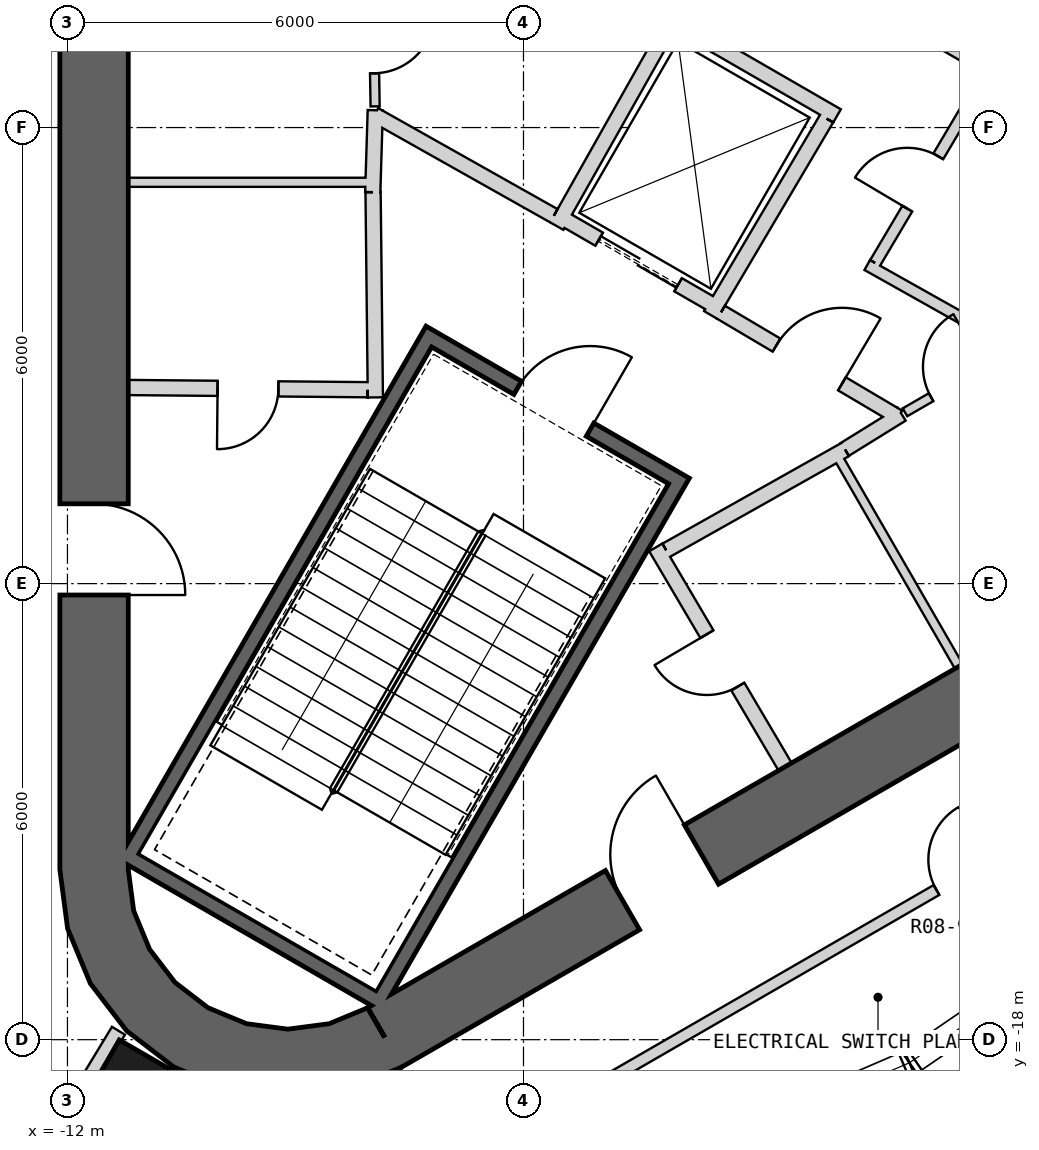
"""IFC4 building model, lengths in metres.
Left out: names, types, materials, properties, quantities, classifications, styles, units other than length and angle.
Written with IfcOpenShell. Run it as: python <this file> out.ifc"""

import sys

from ifc_helpers import new_model, si_unit, direction, frame, frame_2d, origin, origin_2d, place, context, subcontext, project, spatial, polyline, rectangle, outline, extrude, element, fill, save


model = new_model("IFC4")
c1 = context("Model", 3, precision=1e-05, world=origin(), true_north=direction((0.0, 1.0)))
c2 = subcontext(c1, "Body", "Model", "MODEL_VIEW")
j1 = project(units=[si_unit("LENGTHUNIT", "METRE"), si_unit("PLANEANGLEUNIT", "RADIAN")], contexts=[c1])
p1 = place(None, origin())
s1 = spatial("IfcSite", under=j1, at=p1, CompositionType="ELEMENT")
p2 = place(p1, origin())
s2 = spatial("IfcBuilding", under=s1, at=p2, CompositionType="ELEMENT")
p3 = place(p2, frame((0.0, 0.0, 430.3)))
s3 = spatial("IfcBuildingStorey", under=s2, at=p3, CompositionType="ELEMENT", Elevation=430.3)
p4 = place(p3, frame((-11.025, -19.097, 0.0), z_axis=(0.0, 0.0, 1.0), x_axis=(-0.5, -0.866025403784, 0.0)))
e1 = element("IfcColumn", 1, at=p4, inside=s3, PredefinedType="COLUMN", context=c2, shape_type="SweptSolid", body=[
    extrude(rectangle(XDim=1.6, YDim=1.6, at=origin_2d()), origin(), (0.0, 0.0, 1.0), 5.0),
])
p5 = place(p3, frame((-11.65, 15.762, 0.0), z_axis=(0.0, 0.0, 1.0), x_axis=(0.0, -1.0, 0.0)))
e2 = element("IfcWall", 2, at=p5, inside=s3, PredefinedType="SHEAR", context=c2, shape_type="SweptSolid", body=[
    extrude(rectangle(XDim=31.523, YDim=0.9, at=frame_2d((15.762, 0.0))), origin(), (0.0, 0.0, 1.0), 5.0),
])
p6 = place(p5, frame((3.612, 0.0, 0.0)))
e3 = element("IfcOpeningElement", 3, at=p6, cuts=e2, PredefinedType="OPENING", context=c2, shape_type="SweptSolid", body=[
    extrude(rectangle(XDim=1.2, YDim=2.4, at=frame_2d((0.6, 1.2))), frame((0.0, 0.46, 0.0), z_axis=(0.0, -1.0, 0.0), x_axis=(1.0, 0.0, 0.0)), (0.0, 0.0, 1.0), 0.92),
])
p7 = place(p5, frame((26.712, 0.0, 0.0)))
e4 = element("IfcOpeningElement", 4, at=p7, cuts=e2, PredefinedType="OPENING", context=c2, shape_type="SweptSolid", body=[
    extrude(rectangle(XDim=1.2, YDim=2.4, at=frame_2d((0.6, 1.2))), frame((0.0, 0.46, 0.0), z_axis=(0.0, -1.0, 0.0), x_axis=(1.0, 0.0, 0.0)), (0.0, 0.0, 1.0), 0.92),
])
p8 = place(p3, frame((-7.825, -17.97, 0.0), z_axis=(0.0, 0.0, 1.0), x_axis=(0.866028369851, 0.499994862586, 0.0)))
e5 = element("IfcWall", 5, at=p8, inside=s3, PredefinedType="SHEAR", context=c2, shape_type="SweptSolid", body=[
    extrude(rectangle(XDim=31.523, YDim=0.9, at=frame_2d((15.762, 0.0))), origin(), (0.0, 0.0, 1.0), 5.0),
])
p9 = place(p8, frame((17.862, 0.0, 0.0)))
e6 = element("IfcOpeningElement", 6, at=p9, cuts=e5, PredefinedType="OPENING", context=c2, shape_type="SweptSolid", body=[
    extrude(rectangle(XDim=1.2, YDim=2.4, at=frame_2d((0.6, 1.2))), frame((0.0, 0.46, 0.0), z_axis=(0.0, -1.0, 0.0), x_axis=(1.0, 0.0, 0.0)), (0.0, 0.0, 1.0), 0.92),
])
p10 = place(p8, frame((20.562, 0.0, 0.0)))
e7 = element("IfcOpeningElement", 7, at=p10, cuts=e5, PredefinedType="OPENING", context=c2, shape_type="SweptSolid", body=[
    extrude(rectangle(XDim=1.2, YDim=2.4, at=frame_2d((0.6, 1.2))), frame((0.0, 0.46, 0.0), z_axis=(0.0, -1.0, 0.0), x_axis=(1.0, 0.0, 0.0)), (0.0, 0.0, 1.0), 0.92),
])
p11 = place(p8, frame((26.712, 0.0, 0.0)))
e8 = element("IfcOpeningElement", 8, at=p11, cuts=e5, PredefinedType="OPENING", context=c2, shape_type="SweptSolid", body=[
    extrude(rectangle(XDim=1.2, YDim=2.4, at=frame_2d((0.6, 1.2))), frame((0.0, 0.46, 0.0), z_axis=(0.0, -1.0, 0.0), x_axis=(1.0, 0.0, 0.0)), (0.0, 0.0, 1.0), 0.92),
])
p12 = place(p8, frame((3.612, 0.0, 0.0)))
e9 = element("IfcOpeningElement", 9, at=p12, cuts=e5, PredefinedType="OPENING", context=c2, shape_type="SweptSolid", body=[
    extrude(rectangle(XDim=1.2, YDim=2.4, at=frame_2d((0.6, 1.2))), frame((0.0, 0.46, 0.0), z_axis=(0.0, -1.0, 0.0), x_axis=(1.0, 0.0, 0.0)), (0.0, 0.0, 1.0), 0.92),
])
p13 = place(p3, origin())
e10 = element("IfcWall", 10, at=p13, inside=s3, PredefinedType="SHEAR", context=c2, shape_type="SweptSolid", body=[
    extrude(outline(polyline([(-12.1, -15.762), (-11.998, -16.538), (-11.698, -17.262), (-11.221, -17.883), (-10.6, -18.36), (-9.876, -18.659), (-9.1, -18.762), (-8.323, -18.659), (-7.6, -18.36), (-8.05, -17.58), (-8.556, -17.79), (-9.1, -17.862), (-9.644, -17.79), (-10.15, -17.58), (-10.585, -17.247), (-10.919, -16.812), (-11.128, -16.305), (-11.2, -15.762), (-12.1, -15.762)])), origin(), (0.0, 0.0, 1.0), 5.0),
])
p14 = place(p3, frame((-3.905, -10.563, -0.25), z_axis=(0.0, 0.0, 1.0), x_axis=(-0.500012932018, -0.866017937352, 0.0)))
e11 = element("IfcWall", 11, at=p14, inside=s3, PredefinedType="SHEAR", context=c2, shape_type="SweptSolid", body=[
    extrude(rectangle(XDim=8.1, YDim=0.2, at=frame_2d((4.05, 0.0))), origin(), (0.0, 0.0, 1.0), 5.0),
])
p15 = place(p3, frame((-11.282, -15.541, -0.25), z_axis=(0.0, 0.0, 1.0), x_axis=(0.866000483506, -0.500043160704, 0.0)))
e12 = element("IfcWall", 12, at=p15, inside=s3, PredefinedType="SHEAR", context=c2, shape_type="SweptSolid", body=[
    extrude(rectangle(XDim=3.8, YDim=0.2, at=frame_2d((1.9, 0.0))), origin(), (0.0, 0.0, 1.0), 5.0),
])
p16 = place(p3, frame((-7.196, -8.663, -0.25), z_axis=(0.0, 0.0, 1.0), x_axis=(-0.499997992926, -0.866026562566, 0.0)))
e13 = element("IfcWall", 13, at=p16, inside=s3, PredefinedType="SHEAR", context=c2, shape_type="SweptSolid", body=[
    extrude(rectangle(XDim=7.9, YDim=0.2, at=frame_2d((3.95, 0.0))), origin(), (0.0, 0.0, 1.0), 5.0),
])
p17 = place(p3, frame((-4.041, -10.599, -0.25), z_axis=(0.0, 0.0, 1.0), x_axis=(-0.866047807691, 0.499961193289, 0.0)))
e14 = element("IfcWall", 14, at=p17, inside=s3, PredefinedType="SHEAR", context=c2, shape_type="SweptSolid", body=[
    extrude(rectangle(XDim=3.6, YDim=0.2, at=frame_2d((1.8, 0.0))), origin(), (0.0, 0.0, 1.0), 5.0),
])
p18 = place(p17, frame((1.25, 0.0, 0.25)))
e15 = element("IfcOpeningElement", 15, at=p18, cuts=e14, PredefinedType="OPENING", context=c2, shape_type="SweptSolid", body=[
    extrude(rectangle(XDim=1.1, YDim=2.1, at=frame_2d((0.55, 1.05))), frame((0.0, 0.11, 0.0), z_axis=(0.0, -1.0, 0.0), x_axis=(1.0, 0.0, 0.0)), (0.0, 0.0, 1.0), 0.22),
])
p19 = place(p3, frame((-3.446, -8.368, 0.0), z_axis=(0.0, 0.0, 1.0), x_axis=(-0.866024647952, 0.500001309137, 0.0)))
e16 = element("IfcWall", 16, at=p19, inside=s3, PredefinedType="PLUMBINGWALL", context=c2, shape_type="SweptSolid", body=[
    extrude(rectangle(XDim=2.4, YDim=0.2, at=frame_2d((1.2, 0.0))), origin(), (0.0, 0.0, 1.0), 4.75),
])
p20 = place(p19, frame((0.6, 0.0, 0.0)))
e17 = element("IfcOpeningElement", 17, at=p20, cuts=e16, PredefinedType="OPENING", context=c2, shape_type="SweptSolid", body=[
    extrude(rectangle(XDim=1.2, YDim=2.4, at=frame_2d((0.6, 1.2))), frame((0.0, 0.11, 0.0), z_axis=(0.0, -1.0, 0.0), x_axis=(1.0, 0.0, 0.0)), (0.0, 0.0, 1.0), 0.22),
])
p21 = place(p3, frame((-5.562, -7.296, 0.0), z_axis=(0.0, 0.0, 1.0), x_axis=(0.491358283181, 0.870957540612, 0.0)))
e18 = element("IfcWall", 18, at=p21, inside=s3, PredefinedType="PLUMBINGWALL", context=c2, shape_type="SweptSolid", body=[
    extrude(rectangle(XDim=3.2, YDim=0.2, at=frame_2d((1.6, 0.0))), origin(), (0.0, 0.0, 1.0), 4.75),
])
p22 = place(p3, frame((-3.953, -4.646, 0.0), z_axis=(0.0, 0.0, 1.0), x_axis=(0.866024647952, -0.500001309137, 0.0)))
e19 = element("IfcWall", 19, at=p22, inside=s3, PredefinedType="PLUMBINGWALL", context=c2, shape_type="SweptSolid", body=[
    extrude(rectangle(XDim=2.4, YDim=0.2, at=frame_2d((1.2, 0.0))), origin(), (0.0, 0.0, 1.0), 4.75),
])
p23 = place(p3, frame((-2.012, -5.882, 0.0), z_axis=(0.0, 0.0, 1.0), x_axis=(-0.508619639323, -0.860991325447, 0.0)))
e20 = element("IfcWall", 20, at=p23, inside=s3, PredefinedType="PLUMBINGWALL", context=c2, shape_type="SweptSolid", body=[
    extrude(rectangle(XDim=3.0, YDim=0.2, at=frame_2d((1.5, 0.0))), origin(), (0.0, 0.0, 1.0), 4.75),
])
p24 = place(p3, frame((-11.2, -6.72, 0.0), z_axis=(0.0, 0.0, 1.0), x_axis=(1.0, 0.0, 0.0)))
e21 = element("IfcWall", 21, at=p24, inside=s3, PredefinedType="PARTITIONING", context=c2, shape_type="SweptSolid", body=[
    extrude(rectangle(XDim=3.25, YDim=0.12, at=frame_2d((1.625, 0.0))), origin(), (0.0, 0.0, 1.0), 4.75),
])
p25 = place(p3, frame((-7.983, -6.85, 0.0), z_axis=(0.0, 0.0, 1.0), x_axis=(0.030803413295, 0.999525462272, 0.0)))
e22 = element("IfcWall", 22, at=p25, inside=s3, PredefinedType="PARTITIONING", context=c2, shape_type="SweptSolid", body=[
    extrude(rectangle(XDim=1.078, YDim=0.2, at=frame_2d((0.539, 0.0))), origin(), (0.0, 0.0, 1.0), 4.75),
])
p26 = place(p3, frame((-7.98, -4.05, 0.0), z_axis=(0.0, 0.0, 1.0), x_axis=(0.016798213807, -0.999858900052, 0.0)))
e23 = element("IfcWall", 23, at=p26, inside=s3, PredefinedType="PARTITIONING", context=c2, shape_type="SweptSolid", body=[
    extrude(rectangle(XDim=1.671, YDim=0.12, at=frame_2d((0.836, 0.0))), origin(), (0.0, 0.0, 1.0), 4.75),
])
p27 = place(p26, frame((0.436, 0.0, 0.0)))
e24 = element("IfcOpeningElement", 24, at=p27, cuts=e23, PredefinedType="OPENING", context=c2, shape_type="SweptSolid", body=[
    extrude(rectangle(XDim=0.8, YDim=2.1, at=frame_2d((0.4, 1.05))), frame((0.0, 0.07, 0.0), z_axis=(0.0, -1.0, 0.0), x_axis=(1.0, 0.0, 0.0)), (0.0, 0.0, 1.0), 0.14),
])
p28 = place(p3, frame((-7.949, -9.55, 0.0), z_axis=(0.0, 0.0, 1.0), x_axis=(-0.011121475088, 0.999938154483, 0.0)))
e25 = element("IfcWall", 25, at=p28, inside=s3, PredefinedType="PARTITIONING", context=c2, shape_type="SweptSolid", body=[
    extrude(rectangle(XDim=2.7, YDim=0.2, at=frame_2d((1.35, 0.0))), origin(), (0.0, 0.0, 1.0), 4.75),
])
p29 = place(p3, frame((-11.2, -9.42, 0.0), z_axis=(0.0, 0.0, 1.0), x_axis=(0.999957467379, -0.009222983926, 0.0)))
e26 = element("IfcWall", 26, at=p29, inside=s3, PredefinedType="PARTITIONING", context=c2, shape_type="SweptSolid", body=[
    extrude(rectangle(XDim=3.15, YDim=0.2, at=frame_2d((1.575, 0.0))), origin(), (0.0, 0.0, 1.0), 4.75),
])
p30 = place(p29, frame((1.175, 0.0, 0.0)))
e27 = element("IfcOpeningElement", 27, at=p30, cuts=e26, PredefinedType="OPENING", context=c2, shape_type="SweptSolid", body=[
    extrude(rectangle(XDim=0.8, YDim=2.1, at=frame_2d((0.4, 1.05))), frame((0.0, 0.11, 0.0), z_axis=(0.0, -1.0, 0.0), x_axis=(1.0, 0.0, 0.0)), (0.0, 0.0, 1.0), 0.22),
])
p31 = place(p3, frame((-1.897, -10.275, 0.0), z_axis=(0.0, 0.0, 1.0), x_axis=(0.499984717929, -0.866034226713, 0.0)))
e28 = element("IfcWall", 28, at=p31, inside=s3, PredefinedType="PARTITIONING", context=c2, shape_type="SweptSolid", body=[
    extrude(rectangle(XDim=3.25, YDim=0.12, at=frame_2d((1.625, 0.0))), origin(), (0.0, 0.0, 1.0), 4.75),
])
p32 = place(p3, frame((-4.26, -11.524, 0.0), z_axis=(0.0, 0.0, 1.0), x_axis=(0.507997497166, -0.861358544901, 0.0)))
e29 = element("IfcWall", 29, at=p32, inside=s3, PredefinedType="PARTITIONING", context=c2, shape_type="SweptSolid", body=[
    extrude(rectangle(XDim=3.35, YDim=0.2, at=frame_2d((1.675, 0.0))), origin(), (0.0, 0.0, 1.0), 4.75),
])
p33 = place(p32, frame((1.325, 0.0, 0.0)))
e30 = element("IfcOpeningElement", 30, at=p33, cuts=e29, PredefinedType="OPENING", context=c2, shape_type="SweptSolid", body=[
    extrude(rectangle(XDim=0.8, YDim=2.1, at=frame_2d((0.4, 1.05))), frame((0.0, 0.11, 0.0), z_axis=(0.0, -1.0, 0.0), x_axis=(1.0, 0.0, 0.0)), (0.0, 0.0, 1.0), 0.22),
])
p34 = place(p3, frame((-1.769, -10.237, 0.0), z_axis=(0.0, 0.0, 1.0), x_axis=(-0.871534483978, -0.490334215854, 0.0)))
e31 = element("IfcWall", 31, at=p34, inside=s3, PredefinedType="PARTITIONING", context=c2, shape_type="SweptSolid", body=[
    extrude(rectangle(XDim=2.7, YDim=0.2, at=frame_2d((1.35, 0.0))), origin(), (0.0, 0.0, 1.0), 4.75),
])
p35 = place(p3, frame((-1.024, -9.771, 0.0), z_axis=(0.0, 0.0, 1.0), x_axis=(-0.850348075135, -0.526220629693, 0.0)))
e32 = element("IfcWall", 32, at=p35, inside=s3, PredefinedType="PARTITIONING", context=c2, shape_type="SweptSolid", body=[
    extrude(rectangle(XDim=0.878, YDim=0.2, at=frame_2d((0.439, 0.0))), origin(), (0.0, 0.0, 1.0), 4.75),
])
p36 = place(p3, frame((0.4, -8.949, 0.0), z_axis=(0.0, 0.0, 1.0), x_axis=(-0.866019818373, -0.500009674092, 0.0)))
e33 = element("IfcWall", 33, at=p36, inside=s3, PredefinedType="PARTITIONING", context=c2, shape_type="SweptSolid", body=[
    extrude(rectangle(XDim=1.594, YDim=0.12, at=frame_2d((0.797, 0.0))), origin(), (0.0, 0.0, 1.0), 4.75),
])
p37 = place(p36, frame((0.397, 0.0, 0.0)))
e34 = element("IfcOpeningElement", 34, at=p37, cuts=e33, PredefinedType="OPENING", context=c2, shape_type="SweptSolid", body=[
    extrude(rectangle(XDim=0.8, YDim=2.1, at=frame_2d((0.4, 1.05))), frame((0.0, 0.07, 0.0), z_axis=(0.0, -1.0, 0.0), x_axis=(1.0, 0.0, 0.0)), (0.0, 0.0, 1.0), 0.14),
])
p38 = place(p3, frame((-7.959, -5.832, 0.0), z_axis=(0.0, 0.0, 1.0), x_axis=(0.871322567751, -0.490710691679, 0.0)))
e35 = element("IfcWall", 35, at=p38, inside=s3, PredefinedType="PARTITIONING", context=c2, shape_type="SweptSolid", body=[
    extrude(rectangle(XDim=2.708, YDim=0.2, at=frame_2d((1.354, 0.0))), origin(), (0.0, 0.0, 1.0), 4.75),
])
p39 = place(p3, frame((-3.401, -8.43, 0.0), z_axis=(0.0, 0.0, 1.0), x_axis=(0.860617791406, -0.509251428192, 0.0)))
e36 = element("IfcWall", 36, at=p39, inside=s3, PredefinedType="PARTITIONING", context=c2, shape_type="SweptSolid", body=[
    extrude(rectangle(XDim=2.709, YDim=0.2, at=frame_2d((1.354, 0.0))), origin(), (0.0, 0.0, 1.0), 4.75),
])
p40 = place(p39, frame((0.848, 0.0, 0.0)))
e37 = element("IfcOpeningElement", 37, at=p40, cuts=e36, PredefinedType="OPENING", context=c2, shape_type="SweptSolid", body=[
    extrude(rectangle(XDim=1.0, YDim=2.1, at=frame_2d((0.5, 1.05))), frame((0.0, 0.11, 0.0), z_axis=(0.0, -1.0, 0.0), x_axis=(1.0, 0.0, 0.0)), (0.0, 0.0, 1.0), 0.22),
])
p41 = place(p3, frame((-1.477, -7.808, 0.0), z_axis=(0.0, 0.0, 1.0), x_axis=(0.871829948107, -0.48980867855, 0.0)))
e38 = element("IfcWall", 38, at=p41, inside=s3, PredefinedType="PLUMBINGWALL", context=c2, shape_type="SweptSolid", body=[
    extrude(rectangle(XDim=2.152, YDim=0.15, at=frame_2d((1.076, 0.0))), origin(), (0.0, 0.0, 1.0), 4.75),
])
p42 = place(p3, frame((-0.119, -5.664, 0.0), z_axis=(0.0, 0.0, 1.0), x_axis=(-0.509935662771, -0.860212543406, 0.0)))
e39 = element("IfcWall", 39, at=p42, inside=s3, PredefinedType="PLUMBINGWALL", context=c2, shape_type="SweptSolid", body=[
    extrude(rectangle(XDim=2.46, YDim=0.15, at=frame_2d((1.23, 0.0))), origin(), (0.0, 0.0, 1.0), 4.75),
])
p43 = place(p42, frame((0.83, 0.0, 0.0)))
e40 = element("IfcOpeningElement", 40, at=p43, cuts=e39, PredefinedType="OPENING", context=c2, shape_type="SweptSolid", body=[
    extrude(rectangle(XDim=0.8, YDim=2.1, at=frame_2d((0.4, 1.05))), frame((0.0, 0.085, 0.0), z_axis=(0.0, -1.0, 0.0), x_axis=(1.0, 0.0, 0.0)), (0.0, 0.0, 1.0), 0.17),
])
p44 = place(p3, frame((-1.436, -4.367, 0.0), z_axis=(0.0, 0.0, 1.0), x_axis=(0.866087547558, -0.499892348375, 0.0)))
e41 = element("IfcWall", 41, at=p44, inside=s3, PredefinedType="PARTITIONING", context=c2, shape_type="SweptSolid", body=[
    extrude(rectangle(XDim=1.7, YDim=0.12, at=frame_2d((0.85, 0.0))), origin(), (0.0, 0.0, 1.0), 4.75),
])
p45 = place(p3, frame((-12.104, -19.161, 0.0), z_axis=(0.0, 0.0, 1.0), x_axis=(0.518475368733, 0.855092563421, 0.0)))
e42 = element("IfcWall", 42, at=p45, inside=s3, PredefinedType="PARTITIONING", context=c2, shape_type="SweptSolid", body=[
    extrude(rectangle(XDim=1.496, YDim=0.2, at=frame_2d((0.748, 0.0))), origin(), (0.0, 0.0, 1.0), 4.75),
])
p46 = place(p3, frame((-7.213, -19.868, 0.0), z_axis=(0.0, 0.0, 1.0), x_axis=(0.866028156973, 0.499995231308, 0.0)))
e43 = element("IfcWall", 43, at=p46, inside=s3, PredefinedType="PLUMBINGWALL", context=c2, shape_type="SweptSolid", body=[
    extrude(rectangle(XDim=16.063, YDim=0.15, at=frame_2d((8.032, 0.0))), origin(), (0.0, 0.0, 1.0), 4.75),
])
p47 = place(p46, frame((7.675, 0.0, 0.0)))
e44 = element("IfcOpeningElement", 44, at=p47, cuts=e43, PredefinedType="OPENING", context=c2, shape_type="SweptSolid", body=[
    extrude(rectangle(XDim=0.8, YDim=2.1, at=frame_2d((0.4, 1.05))), frame((0.0, 0.085, 0.0), z_axis=(0.0, -1.0, 0.0), x_axis=(1.0, 0.0, 0.0)), (0.0, 0.0, 1.0), 0.17),
])
p48 = place(p18, origin())
e45 = element("IfcDoor", 45, at=p48, inside=s3, OperationType="SINGLE_SWING_LEFT", PredefinedType="USERDEFINED", context=c2, shape_type="SweptSolid", body=[
    extrude(rectangle(XDim=1.1, YDim=2.1, at=frame_2d((0.55, 1.05))), frame((0.0, 0.025, 0.0), z_axis=(0.0, -1.0, 0.0), x_axis=(1.0, 0.0, 0.0)), (0.0, 0.0, 1.0), 0.05),
])
fill(e15, e45)
p49 = place(p40, origin())
e46 = element("IfcDoor", 46, at=p49, inside=s3, OperationType="SINGLE_SWING_RIGHT", PredefinedType="USERDEFINED", context=c2, shape_type="SweptSolid", body=[
    extrude(rectangle(XDim=1.0, YDim=2.1, at=frame_2d((0.5, 1.05))), frame((0.0, 0.025, 0.0), z_axis=(0.0, -1.0, 0.0), x_axis=(1.0, 0.0, 0.0)), (0.0, 0.0, 1.0), 0.05),
])
fill(e37, e46)
p50 = place(p20, origin())
e47 = element("IfcDoor", 47, at=p50, inside=s3, OperationType="SLIDING_TO_LEFT", PredefinedType="USERDEFINED", context=c2, shape_type="SweptSolid", body=[
    extrude(rectangle(XDim=1.2, YDim=2.4, at=frame_2d((0.6, 1.2))), frame((0.0, 0.025, 0.0), z_axis=(0.0, -1.0, 0.0), x_axis=(1.0, 0.0, 0.0)), (0.0, 0.0, 1.0), 0.05),
])
fill(e17, e47)
p51 = place(p43, origin())
e48 = element("IfcDoor", 48, at=p51, inside=s3, OperationType="SINGLE_SWING_RIGHT", PredefinedType="USERDEFINED", context=c2, shape_type="SweptSolid", body=[
    extrude(rectangle(XDim=0.8, YDim=2.1, at=frame_2d((0.4, 1.05))), frame((0.0, 0.025, 0.0), z_axis=(0.0, -1.0, 0.0), x_axis=(1.0, 0.0, 0.0)), (0.0, 0.0, 1.0), 0.05),
])
fill(e40, e48)
p52 = place(p27, origin())
e49 = element("IfcDoor", 49, at=p52, inside=s3, OperationType="SINGLE_SWING_LEFT", PredefinedType="USERDEFINED", context=c2, shape_type="SweptSolid", body=[
    extrude(rectangle(XDim=0.8, YDim=2.1, at=frame_2d((0.4, 1.05))), frame((0.0, 0.025, 0.0), z_axis=(0.0, -1.0, 0.0), x_axis=(1.0, 0.0, 0.0)), (0.0, 0.0, 1.0), 0.05),
])
fill(e24, e49)
p53 = place(p30, origin())
e50 = element("IfcDoor", 50, at=p53, inside=s3, OperationType="SINGLE_SWING_LEFT", PredefinedType="USERDEFINED", context=c2, shape_type="SweptSolid", body=[
    extrude(rectangle(XDim=0.8, YDim=2.1, at=frame_2d((0.4, 1.05))), frame((0.0, 0.025, 0.0), z_axis=(0.0, -1.0, 0.0), x_axis=(1.0, 0.0, 0.0)), (0.0, 0.0, 1.0), 0.05),
])
fill(e27, e50)
p54 = place(p33, origin())
e51 = element("IfcDoor", 51, at=p54, inside=s3, OperationType="SINGLE_SWING_LEFT", PredefinedType="USERDEFINED", context=c2, shape_type="SweptSolid", body=[
    extrude(rectangle(XDim=0.8, YDim=2.1, at=frame_2d((0.4, 1.05))), frame((0.0, 0.025, 0.0), z_axis=(0.0, -1.0, 0.0), x_axis=(1.0, 0.0, 0.0)), (0.0, 0.0, 1.0), 0.05),
])
fill(e30, e51)
p55 = place(p37, origin())
e52 = element("IfcDoor", 52, at=p55, inside=s3, OperationType="SINGLE_SWING_LEFT", PredefinedType="USERDEFINED", context=c2, shape_type="SweptSolid", body=[
    extrude(rectangle(XDim=0.8, YDim=2.1, at=frame_2d((0.4, 1.05))), frame((0.0, 0.025, 0.0), z_axis=(0.0, -1.0, 0.0), x_axis=(1.0, 0.0, 0.0)), (0.0, 0.0, 1.0), 0.05),
])
fill(e34, e52)
p56 = place(p47, origin())
e53 = element("IfcDoor", 53, at=p56, inside=s3, OperationType="SINGLE_SWING_RIGHT", PredefinedType="USERDEFINED", context=c2, shape_type="SweptSolid", body=[
    extrude(rectangle(XDim=0.8, YDim=2.1, at=frame_2d((0.4, 1.05))), frame((0.0, 0.025, 0.0), z_axis=(0.0, -1.0, 0.0), x_axis=(1.0, 0.0, 0.0)), (0.0, 0.0, 1.0), 0.05),
])
fill(e44, e53)
p57 = place(p7, origin())
e54 = element("IfcDoor", 54, at=p57, inside=s3, OperationType="SINGLE_SWING_RIGHT", PredefinedType="USERDEFINED", context=c2, shape_type="SweptSolid", body=[
    extrude(rectangle(XDim=1.2, YDim=2.4, at=frame_2d((0.6, 1.2))), frame((0.0, 0.025, 0.0), z_axis=(0.0, -1.0, 0.0), x_axis=(1.0, 0.0, 0.0)), (0.0, 0.0, 1.0), 0.05),
])
fill(e4, e54)
p58 = place(p12, origin())
e55 = element("IfcDoor", 55, at=p58, inside=s3, OperationType="SINGLE_SWING_RIGHT", PredefinedType="USERDEFINED", context=c2, shape_type="SweptSolid", body=[
    extrude(rectangle(XDim=1.2, YDim=2.4, at=frame_2d((0.6, 1.2))), frame((0.0, 0.025, 0.0), z_axis=(0.0, -1.0, 0.0), x_axis=(1.0, 0.0, 0.0)), (0.0, 0.0, 1.0), 0.05),
])
fill(e9, e55)
save(model, sys.argv[1])
